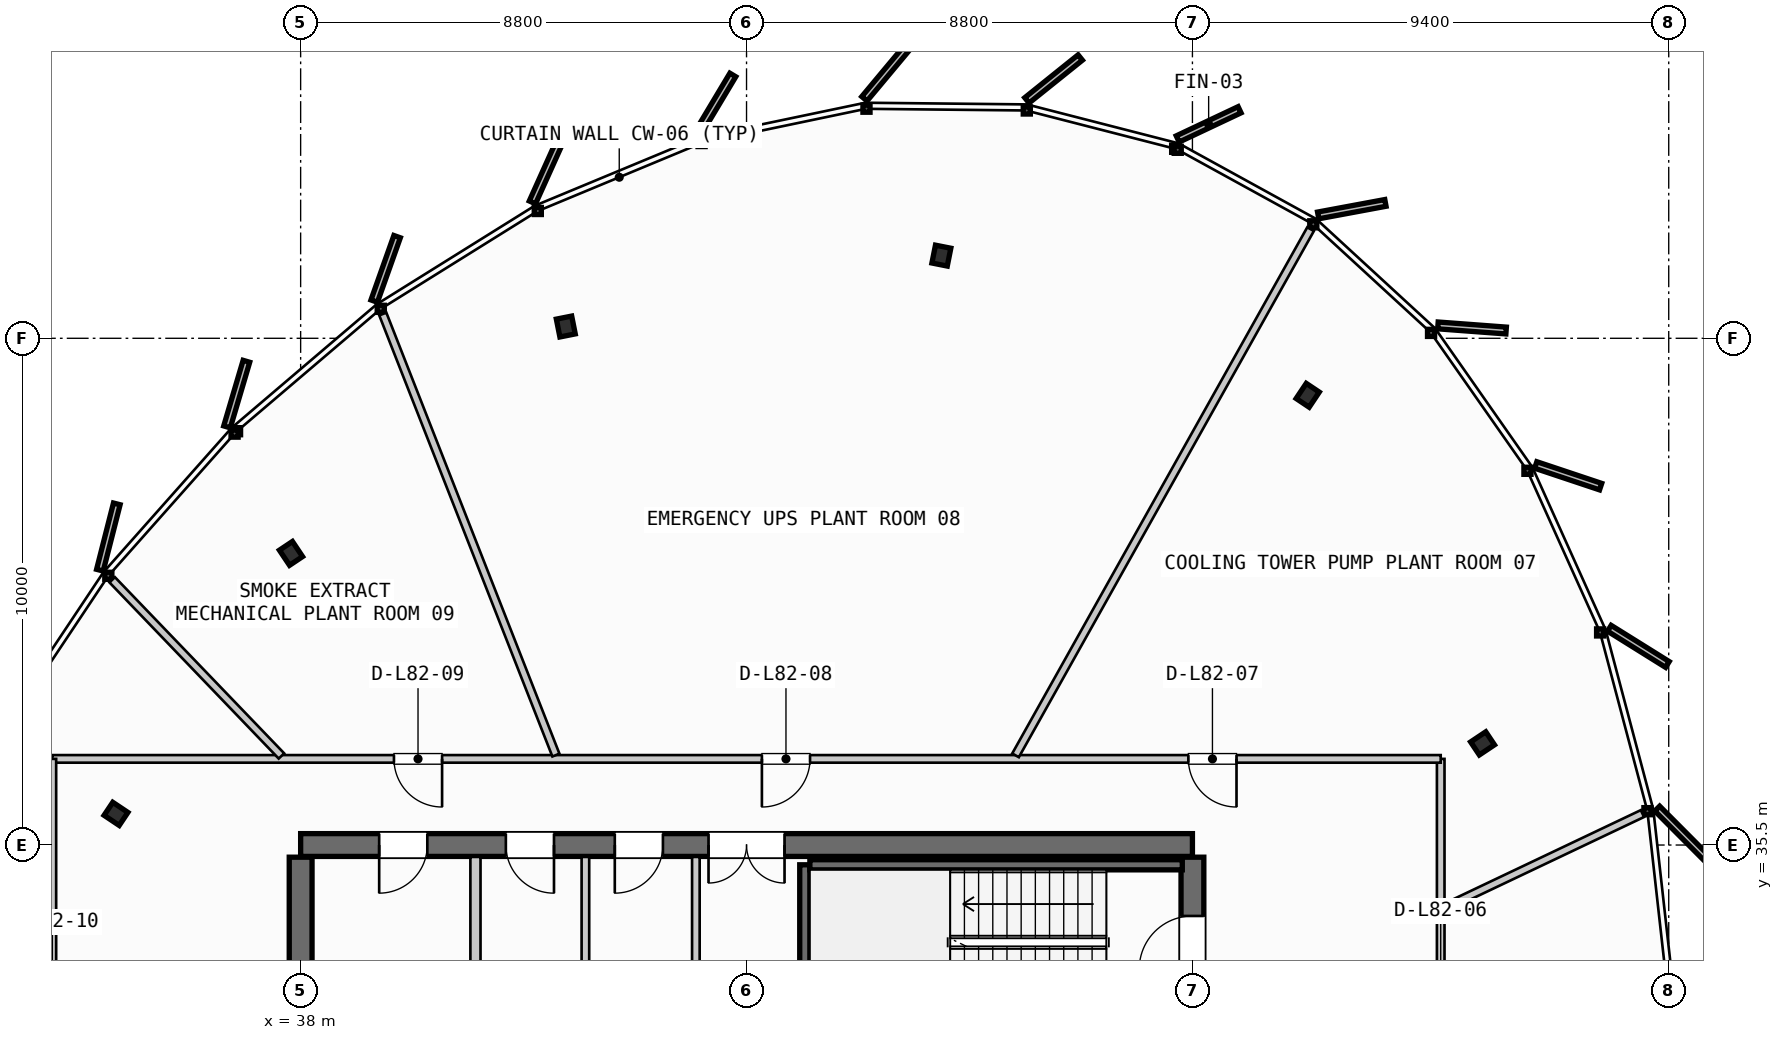
"""IFC4 building model, lengths in metres.
Left out: names, types, materials, properties, quantities, classifications, styles, units other than length and angle.
Written with IfcOpenShell. Run it as: python <this file> out.ifc"""

import sys

from ifc_helpers import new_model, si_unit, direction, frame, frame_2d, origin, origin_2d, place, context, subcontext, project, spatial, rectangle, i_section, extrude, source, transform, mapped, element, fill, save


model = new_model("IFC4")
c1 = context("Model", 3, precision=1e-05, world=origin(), true_north=direction((0.0, 1.0)))
c2 = subcontext(c1, "Body", "Model", "MODEL_VIEW")
j1 = project(units=[si_unit("LENGTHUNIT", "METRE"), si_unit("PLANEANGLEUNIT", "RADIAN")], contexts=[c1])
p1 = place(None, origin())
s1 = spatial("IfcSite", under=j1, at=p1, CompositionType="ELEMENT")
p2 = place(p1, origin())
s2 = spatial("IfcBuilding", under=s1, at=p2, CompositionType="ELEMENT")
p3 = place(p2, frame((0.0, 0.0, 308.3)))
s3 = spatial("IfcBuildingStorey", under=s2, at=p3, CompositionType="ELEMENT", Elevation=308.3)
p4 = place(p3, frame((55.6, 35.5, 0.0), z_axis=(0.0, 0.0, 1.0), x_axis=(-1.0, 0.0, 0.0)))
e1 = element("IfcWall", 1, at=p4, inside=s3, PredefinedType="SHEAR", context=c2, shape_type="SweptSolid", body=[
    extrude(rectangle(XDim=17.6, YDim=0.45, at=frame_2d((8.8, 0.0))), origin(), (0.0, 0.0, 1.0), 3.735),
])
p5 = place(p4, frame((8.05, 0.0, 0.0)))
e2 = element("IfcOpeningElement", 2, at=p5, cuts=e1, PredefinedType="OPENING", context=c2, shape_type="SweptSolid", body=[
    extrude(rectangle(XDim=1.5, YDim=2.2, at=frame_2d((0.75, 1.1))), frame((0.0, 0.235, 0.0), z_axis=(0.0, -1.0, 0.0), x_axis=(1.0, 0.0, 0.0)), (0.0, 0.0, 1.0), 0.47),
])
p6 = place(p4, frame((15.1, 0.0, 0.0)))
e3 = element("IfcOpeningElement", 3, at=p6, cuts=e1, PredefinedType="OPENING", context=c2, shape_type="SweptSolid", body=[
    extrude(rectangle(XDim=0.95, YDim=2.15, at=frame_2d((0.475, 1.075))), frame((0.0, 0.235, 0.0), z_axis=(0.0, -1.0, 0.0), x_axis=(1.0, 0.0, 0.0)), (0.0, 0.0, 1.0), 0.47),
])
p7 = place(p4, frame((12.6, 0.0, 0.0)))
e4 = element("IfcOpeningElement", 4, at=p7, cuts=e1, PredefinedType="OPENING", context=c2, shape_type="SweptSolid", body=[
    extrude(rectangle(XDim=0.95, YDim=2.15, at=frame_2d((0.475, 1.075))), frame((0.0, 0.235, 0.0), z_axis=(0.0, -1.0, 0.0), x_axis=(1.0, 0.0, 0.0)), (0.0, 0.0, 1.0), 0.47),
])
p8 = place(p4, frame((10.45, 0.0, 0.0)))
e5 = element("IfcOpeningElement", 5, at=p8, cuts=e1, PredefinedType="OPENING", context=c2, shape_type="SweptSolid", body=[
    extrude(rectangle(XDim=0.95, YDim=2.15, at=frame_2d((0.475, 1.075))), frame((0.0, 0.235, 0.0), z_axis=(0.0, -1.0, 0.0), x_axis=(1.0, 0.0, 0.0)), (0.0, 0.0, 1.0), 0.47),
])
p9 = place(p3, frame((38.0, 35.26, 0.0), z_axis=(0.0, 0.0, 1.0), x_axis=(0.0, -1.0, 0.0)))
e6 = element("IfcWall", 6, at=p9, inside=s3, PredefinedType="SHEAR", context=c2, shape_type="SweptSolid", body=[
    extrude(rectangle(XDim=14.92, YDim=0.45, at=frame_2d((7.46, 0.0))), origin(), (0.0, 0.0, 1.0), 3.735),
])
p10 = place(p9, frame((5.21, 0.0, 0.0)))
e7 = element("IfcOpeningElement", 7, at=p10, cuts=e6, PredefinedType="OPENING", context=c2, shape_type="SweptSolid", body=[
    extrude(rectangle(XDim=1.1, YDim=2.2, at=frame_2d((0.55, 1.1))), frame((0.0, 0.235, 0.0), z_axis=(0.0, -1.0, 0.0), x_axis=(1.0, 0.0, 0.0)), (0.0, 0.0, 1.0), 0.47),
])
p11 = place(p3, frame((55.6, 20.34, 0.0), z_axis=(0.0, 0.0, 1.0), x_axis=(0.0, 1.0, 0.0)))
e8 = element("IfcWall", 8, at=p11, inside=s3, PredefinedType="SHEAR", context=c2, shape_type="SweptSolid", body=[
    extrude(rectangle(XDim=14.92, YDim=0.45, at=frame_2d((7.46, 0.0))), origin(), (0.0, 0.0, 1.0), 3.735),
])
p12 = place(p11, frame((12.71, 0.0, 0.0)))
e9 = element("IfcOpeningElement", 9, at=p12, cuts=e8, PredefinedType="OPENING", context=c2, shape_type="SweptSolid", body=[
    extrude(rectangle(XDim=1.05, YDim=2.15, at=frame_2d((0.525, 1.075))), frame((0.0, 0.235, 0.0), z_axis=(0.0, -1.0, 0.0), x_axis=(1.0, 0.0, 0.0)), (0.0, 0.0, 1.0), 0.47),
])
p13 = place(p11, frame((8.61, 0.0, 0.0)))
e10 = element("IfcOpeningElement", 10, at=p13, cuts=e8, PredefinedType="OPENING", context=c2, shape_type="SweptSolid", body=[
    extrude(rectangle(XDim=1.1, YDim=2.2, at=frame_2d((0.55, 1.1))), frame((0.0, 0.235, 0.0), z_axis=(0.0, -1.0, 0.0), x_axis=(1.0, 0.0, 0.0)), (0.0, 0.0, 1.0), 0.47),
])
m1 = source(origin(), c2, "Body", "SweptSolid", [
    extrude(i_section(OverallWidth=0.309, OverallDepth=0.359, WebThickness=0.016, FlangeThickness=0.026, FilletRadius=0.027, at=origin_2d()), origin(), (0.0, 0.0, 1.0), 3.735),
])
for number, where, z_axis, x_axis in (
    (11, (61.326, 37.506, 0.0), (0.0, 0.0, 1.0), (0.831, 0.556, 0.0)),
    (12, (57.875, 44.375, 0.0), (0.0, 0.0, 1.0), (0.556, 0.831, 0.0)),
    (13, (50.645, 47.132, 0.0), (0.0, 0.0, 1.0), (0.195, 0.981, 0.0)),
    (14, (43.233, 45.732, 0.0), (0.0, 0.0, 1.0), (-0.195, 0.981, 0.0)),
    (15, (37.81, 41.255, 0.0), (0.0, 0.0, 1.0), (-0.556, 0.831, 0.0)),
    (16, (34.356, 36.115, 0.0), (0.0, 0.0, 1.0), (-0.831, 0.556, 0.0)),
):
    element("IfcColumn", number, at=place(p3, frame(where, z_axis=z_axis, x_axis=x_axis)), inside=s3, PredefinedType="COLUMN", context=c2, shape_type="MappedRepresentation", body=[
        mapped(m1, transform((0.0, 0.0, 0.0), scale=1.0)),
    ])
p14 = place(p3, frame((47.95, 32.05, 0.0), z_axis=(0.0, 0.0, 1.0), x_axis=(0.0, 1.0, 0.0)))
e17 = element("IfcWall", 17, at=p14, inside=s3, PredefinedType="SHEAR", context=c2, shape_type="SweptSolid", body=[
    extrude(rectangle(XDim=3.06, YDim=0.2, at=frame_2d((1.53, 0.0))), origin(), (0.0, 0.0, 1.0), 3.735),
])
p15 = place(p3, frame((48.05, 35.11, 0.0), z_axis=(0.0, 0.0, 1.0), x_axis=(1.0, 0.0, 0.0)))
e18 = element("IfcWall", 18, at=p15, inside=s3, PredefinedType="SHEAR", context=c2, shape_type="SweptSolid", body=[
    extrude(rectangle(XDim=7.35, YDim=0.2, at=frame_2d((3.675, 0.0))), origin(), (0.0, 0.0, 1.0), 3.735),
])
p16 = place(p3, frame((41.45, 31.85, 0.0), z_axis=(0.0, 0.0, 1.0), x_axis=(0.0, 1.0, 0.0)))
e19 = element("IfcWall", 19, at=p16, inside=s3, PredefinedType="PARTITIONING", context=c2, shape_type="SweptSolid", body=[
    extrude(rectangle(XDim=3.415, YDim=0.2, at=frame_2d((1.708, 0.0))), origin(), (0.0, 0.0, 1.0), 3.26),
])
p17 = place(p3, frame((45.8, 31.85, 0.0), z_axis=(0.0, 0.0, 1.0), x_axis=(0.0, 1.0, 0.0)))
e20 = element("IfcWall", 20, at=p17, inside=s3, PredefinedType="PARTITIONING", context=c2, shape_type="SweptSolid", body=[
    extrude(rectangle(XDim=3.415, YDim=0.15, at=frame_2d((1.708, 0.0))), origin(), (0.0, 0.0, 1.0), 3.26),
])
p18 = place(p3, frame((43.62, 31.85, 0.0), z_axis=(0.0, 0.0, 1.0), x_axis=(0.0, 1.0, 0.0)))
e21 = element("IfcWall", 21, at=p18, inside=s3, PredefinedType="PLUMBINGWALL", context=c2, shape_type="SweptSolid", body=[
    extrude(rectangle(XDim=3.415, YDim=0.15, at=frame_2d((1.708, 0.0))), origin(), (0.0, 0.0, 1.0), 3.26),
])
p19 = place(p3, frame((60.5, 18.4, 0.0), z_axis=(0.0, 0.0, 1.0), x_axis=(0.0, 1.0, 0.0)))
e22 = element("IfcWall", 22, at=p19, inside=s3, PredefinedType="PARTITIONING", context=c2, shape_type="SweptSolid", body=[
    extrude(rectangle(XDim=18.8, YDim=0.15, at=frame_2d((9.4, 0.0))), origin(), (0.0, 0.0, 1.0), 3.26),
])
p20 = place(p19, frame((4.433, 0.0, 0.0)))
e23 = element("IfcOpeningElement", 23, at=p20, cuts=e22, PredefinedType="OPENING", context=c2, shape_type="SweptSolid", body=[
    extrude(rectangle(XDim=0.95, YDim=2.15, at=frame_2d((0.475, 1.075))), frame((0.0, 0.085, 0.0), z_axis=(0.0, -1.0, 0.0), x_axis=(1.0, 0.0, 0.0)), (0.0, 0.0, 1.0), 0.17),
])
p21 = place(p19, frame((13.672, 0.0, 0.0)))
e24 = element("IfcOpeningElement", 24, at=p21, cuts=e22, PredefinedType="OPENING", context=c2, shape_type="SweptSolid", body=[
    extrude(rectangle(XDim=0.95, YDim=2.15, at=frame_2d((0.475, 1.075))), frame((0.0, 0.085, 0.0), z_axis=(0.0, -1.0, 0.0), x_axis=(1.0, 0.0, 0.0)), (0.0, 0.0, 1.0), 0.17),
])
p22 = place(p3, frame((60.5, 37.2, 0.0), z_axis=(0.0, 0.0, 1.0), x_axis=(-1.0, 0.0, 0.0)))
e25 = element("IfcWall", 25, at=p22, inside=s3, PredefinedType="PARTITIONING", context=c2, shape_type="SweptSolid", body=[
    extrude(rectangle(XDim=27.4, YDim=0.15, at=frame_2d((13.7, 0.0))), origin(), (0.0, 0.0, 1.0), 3.26),
])
p23 = place(p22, frame((4.03, 0.0, 0.0)))
e26 = element("IfcOpeningElement", 26, at=p23, cuts=e25, PredefinedType="OPENING", context=c2, shape_type="SweptSolid", body=[
    extrude(rectangle(XDim=0.95, YDim=2.15, at=frame_2d((0.475, 1.075))), frame((0.0, 0.085, 0.0), z_axis=(0.0, -1.0, 0.0), x_axis=(1.0, 0.0, 0.0)), (0.0, 0.0, 1.0), 0.17),
])
p24 = place(p22, frame((12.447, 0.0, 0.0)))
e27 = element("IfcOpeningElement", 27, at=p24, cuts=e25, PredefinedType="OPENING", context=c2, shape_type="SweptSolid", body=[
    extrude(rectangle(XDim=0.95, YDim=2.15, at=frame_2d((0.475, 1.075))), frame((0.0, 0.085, 0.0), z_axis=(0.0, -1.0, 0.0), x_axis=(1.0, 0.0, 0.0)), (0.0, 0.0, 1.0), 0.17),
])
p25 = place(p22, frame((19.708, 0.0, 0.0)))
e28 = element("IfcOpeningElement", 28, at=p25, cuts=e25, PredefinedType="OPENING", context=c2, shape_type="SweptSolid", body=[
    extrude(rectangle(XDim=0.95, YDim=2.15, at=frame_2d((0.475, 1.075))), frame((0.0, 0.085, 0.0), z_axis=(0.0, -1.0, 0.0), x_axis=(1.0, 0.0, 0.0)), (0.0, 0.0, 1.0), 0.17),
])
p26 = place(p3, frame((33.1, 37.2, 0.0), z_axis=(0.0, 0.0, 1.0), x_axis=(0.0, -1.0, 0.0)))
e29 = element("IfcWall", 29, at=p26, inside=s3, PredefinedType="PARTITIONING", context=c2, shape_type="SweptSolid", body=[
    extrude(rectangle(XDim=18.8, YDim=0.15, at=frame_2d((9.4, 0.0))), origin(), (0.0, 0.0, 1.0), 3.26),
])
p27 = place(p26, frame((13.615, 0.0, 0.0)))
e30 = element("IfcOpeningElement", 30, at=p27, cuts=e29, PredefinedType="OPENING", context=c2, shape_type="SweptSolid", body=[
    extrude(rectangle(XDim=0.95, YDim=2.15, at=frame_2d((0.475, 1.075))), frame((0.0, 0.085, 0.0), z_axis=(0.0, -1.0, 0.0), x_axis=(1.0, 0.0, 0.0)), (0.0, 0.0, 1.0), 0.17),
])
p28 = place(p26, frame((4.395, 0.0, 0.0)))
e31 = element("IfcOpeningElement", 31, at=p28, cuts=e29, PredefinedType="OPENING", context=c2, shape_type="SweptSolid", body=[
    extrude(rectangle(XDim=0.95, YDim=2.15, at=frame_2d((0.475, 1.075))), frame((0.0, 0.085, 0.0), z_axis=(0.0, -1.0, 0.0), x_axis=(1.0, 0.0, 0.0)), (0.0, 0.0, 1.0), 0.17),
])
p29 = place(p3, frame((60.572, 34.264, 0.0), z_axis=(0.0, 0.0, 1.0), x_axis=(0.903261650303, 0.429090189928, 0.0)))
e32 = element("IfcWall", 32, at=p29, inside=s3, PredefinedType="PARTITIONING", context=c2, shape_type="SweptSolid", body=[
    extrude(rectangle(XDim=4.327, YDim=0.15, at=frame_2d((2.164, 0.0))), origin(), (0.0, 0.0, 1.0), 3.26),
])
p30 = place(p3, frame((52.109, 37.27, 0.0), z_axis=(0.0, 0.0, 1.0), x_axis=(0.489088509426, 0.872234160044, 0.0)))
e33 = element("IfcWall", 33, at=p30, inside=s3, PredefinedType="PARTITIONING", context=c2, shape_type="SweptSolid", body=[
    extrude(rectangle(XDim=11.905, YDim=0.15, at=frame_2d((5.952, 0.0))), origin(), (0.0, 0.0, 1.0), 3.26),
])
p31 = place(p3, frame((43.038, 37.274, 0.0), z_axis=(0.0, 0.0, 1.0), x_axis=(-0.365328438703, 0.930878688055, 0.0)))
e34 = element("IfcWall", 34, at=p31, inside=s3, PredefinedType="PARTITIONING", context=c2, shape_type="SweptSolid", body=[
    extrude(rectangle(XDim=9.351, YDim=0.15, at=frame_2d((4.676, 0.0))), origin(), (0.0, 0.0, 1.0), 3.26),
])
p32 = place(p3, frame((37.621, 37.258, 0.0), z_axis=(0.0, 0.0, 1.0), x_axis=(-0.692861722407, 0.72107047757, 0.0)))
e35 = element("IfcWall", 35, at=p32, inside=s3, PredefinedType="PARTITIONING", context=c2, shape_type="SweptSolid", body=[
    extrude(rectangle(XDim=4.821, YDim=0.15, at=frame_2d((2.41, 0.0))), origin(), (0.0, 0.0, 1.0), 3.26),
])
m2 = source(origin(), c2, "Body", "SweptSolid", [
    extrude(rectangle(XDim=1.05, YDim=2.15, at=frame_2d((0.525, 1.075))), frame((0.0, 0.025, 0.0), z_axis=(0.0, -1.0, 0.0), x_axis=(1.0, 0.0, 0.0)), (0.0, 0.0, 1.0), 0.05),
])
p33 = place(p12, origin())
e36 = element("IfcDoor", 36, at=p33, inside=s3, OperationType="SINGLE_SWING_LEFT", PredefinedType="DOOR", context=c2, shape_type="MappedRepresentation", body=[
    mapped(m2, transform((0.0, 0.0, 0.0), scale=1.0)),
])
fill(e9, e36)
m3 = source(origin(), c2, "Body", "SweptSolid", [
    extrude(rectangle(XDim=1.5, YDim=2.2, at=frame_2d((0.75, 1.1))), frame((0.0, 0.025, 0.0), z_axis=(0.0, -1.0, 0.0), x_axis=(1.0, 0.0, 0.0)), (0.0, 0.0, 1.0), 0.05),
])
p34 = place(p5, origin())
e37 = element("IfcDoor", 37, at=p34, inside=s3, OperationType="DOUBLE_DOOR_SINGLE_SWING", PredefinedType="DOOR", context=c2, shape_type="MappedRepresentation", body=[
    mapped(m3, transform((0.0, 0.0, 0.0), scale=1.0)),
])
fill(e2, e37)
m4 = source(origin(), c2, "Body", "SweptSolid", [
    extrude(rectangle(XDim=0.95, YDim=2.15, at=frame_2d((0.475, 1.075))), frame((0.0, 0.025, 0.0), z_axis=(0.0, -1.0, 0.0), x_axis=(1.0, 0.0, 0.0)), (0.0, 0.0, 1.0), 0.05),
])
p35 = place(p6, origin())
e38 = element("IfcDoor", 38, at=p35, inside=s3, OperationType="SINGLE_SWING_RIGHT", PredefinedType="DOOR", context=c2, shape_type="MappedRepresentation", body=[
    mapped(m4, transform((0.0, 0.0, 0.0), scale=1.0)),
])
fill(e3, e38)
p36 = place(p7, origin())
e39 = element("IfcDoor", 39, at=p36, inside=s3, OperationType="SINGLE_SWING_LEFT", PredefinedType="DOOR", context=c2, shape_type="MappedRepresentation", body=[
    mapped(m4, transform((0.0, 0.0, 0.0), scale=1.0)),
])
fill(e4, e39)
p37 = place(p8, origin())
e40 = element("IfcDoor", 40, at=p37, inside=s3, OperationType="SINGLE_SWING_RIGHT", PredefinedType="DOOR", context=c2, shape_type="MappedRepresentation", body=[
    mapped(m4, transform((0.0, 0.0, 0.0), scale=1.0)),
])
fill(e5, e40)
p38 = place(p23, origin())
e41 = element("IfcDoor", 41, at=p38, inside=s3, OperationType="SINGLE_SWING_LEFT", PredefinedType="DOOR", context=c2, shape_type="MappedRepresentation", body=[
    mapped(m4, transform((0.0, 0.0, 0.0), scale=1.0)),
])
fill(e26, e41)
p39 = place(p24, origin())
e42 = element("IfcDoor", 42, at=p39, inside=s3, OperationType="SINGLE_SWING_RIGHT", PredefinedType="DOOR", context=c2, shape_type="MappedRepresentation", body=[
    mapped(m4, transform((0.0, 0.0, 0.0), scale=1.0)),
])
fill(e27, e42)
p40 = place(p25, origin())
e43 = element("IfcDoor", 43, at=p40, inside=s3, OperationType="SINGLE_SWING_LEFT", PredefinedType="DOOR", context=c2, shape_type="MappedRepresentation", body=[
    mapped(m4, transform((0.0, 0.0, 0.0), scale=1.0)),
])
fill(e28, e43)
save(model, sys.argv[1])
